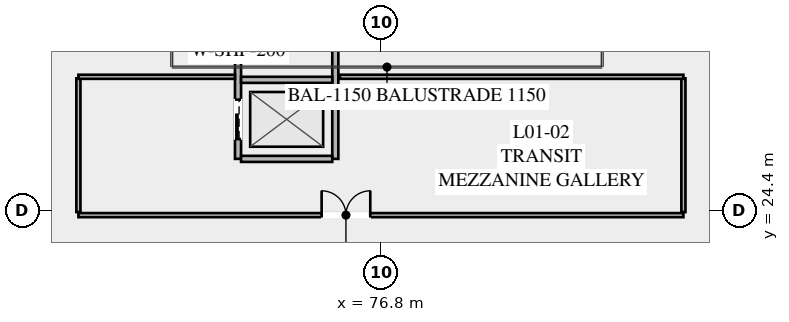
"""IFC4 building model, lengths in metres.
Left out: names, types, materials, properties, quantities, classifications, styles, units other than length and angle.
Written with IfcOpenShell. Run it as: python <this file> out.ifc"""

import sys

from ifc_helpers import new_model, si_unit, direction, frame, frame_2d, origin, place, context, subcontext, project, spatial, rectangle, extrude, element, fill, save


model = new_model("IFC4")
c1 = context("Model", 3, precision=1e-05, world=origin(), true_north=direction((0.0, 1.0)))
c2 = subcontext(c1, "Body", "Model", "MODEL_VIEW")
j1 = project(units=[si_unit("LENGTHUNIT", "METRE"), si_unit("PLANEANGLEUNIT", "RADIAN")], contexts=[c1])
p1 = place(None, origin())
s1 = spatial("IfcSite", under=j1, at=p1, CompositionType="ELEMENT")
p2 = place(p1, origin())
s2 = spatial("IfcBuilding", under=s1, at=p2, CompositionType="ELEMENT")
p3 = place(p2, frame((0.0, 0.0, 5.4)))
s3 = spatial("IfcBuildingStorey", under=s2, at=p3, CompositionType="ELEMENT", Elevation=5.4)
p4 = place(p3, frame((72.1, 26.1, 0.0), z_axis=(0.0, 0.0, 1.0), x_axis=(0.0, 1.0, 0.0)))
e1 = element("IfcWall", 1, at=p4, inside=s3, PredefinedType="SOLIDWALL", context=c2, shape_type="SweptSolid", body=[
    extrude(rectangle(XDim=11.8, YDim=0.2, at=frame_2d((5.9, 0.0))), origin(), (0.0, 0.0, 1.0), 3.583),
])
p5 = place(p4, frame((0.65, 0.0, 0.0)))
e2 = element("IfcOpeningElement", 2, at=p5, cuts=e1, PredefinedType="OPENING", context=c2, shape_type="SweptSolid", body=[
    extrude(rectangle(XDim=1.3, YDim=2.25, at=frame_2d((0.65, 1.125))), frame((0.0, 0.11, 0.0), z_axis=(0.0, -1.0, 0.0), x_axis=(1.0, 0.0, 0.0)), (0.0, 0.0, 1.0), 0.22),
])
p6 = place(p4, frame((9.85, 0.0, 0.0)))
e3 = element("IfcOpeningElement", 3, at=p6, cuts=e1, PredefinedType="OPENING", context=c2, shape_type="SweptSolid", body=[
    extrude(rectangle(XDim=1.3, YDim=2.25, at=frame_2d((0.65, 1.125))), frame((0.0, 0.11, 0.0), z_axis=(0.0, -1.0, 0.0), x_axis=(1.0, 0.0, 0.0)), (0.0, 0.0, 1.0), 0.22),
])
p7 = place(p3, frame((75.3, 26.1, 0.0), z_axis=(0.0, 0.0, 1.0), x_axis=(0.0, 1.0, 0.0)))
e4 = element("IfcWall", 4, at=p7, inside=s3, PredefinedType="SOLIDWALL", context=c2, shape_type="SweptSolid", body=[
    extrude(rectangle(XDim=11.8, YDim=0.2, at=frame_2d((5.9, 0.0))), origin(), (0.0, 0.0, 1.0), 3.583),
])
for number, where, z_axis, x_axis in (
    (5, (72.2, 26.1, 0.0), (0.0, 0.0, 1.0), (1.0, 0.0, 0.0)),
    (6, (72.2, 28.7, 0.0), (0.0, 0.0, 1.0), (1.0, 0.0, 0.0)),
):
    element("IfcWall", number, at=place(p3, frame(where, z_axis=z_axis, x_axis=x_axis)), inside=s3, PredefinedType="SOLIDWALL", context=c2, shape_type="SweptSolid", body=[
        extrude(rectangle(XDim=3.0, YDim=0.2, at=frame_2d((1.5, 0.0))), origin(), (0.0, 0.0, 1.0), 3.583),
    ])
p8 = place(p3, frame((66.85, 24.25, 0.0), z_axis=(0.0, 0.0, 1.0), x_axis=(1.0, 0.0, 0.0)))
e7 = element("IfcWall", 7, at=p8, inside=s3, PredefinedType="PARTITIONING", context=c2, shape_type="SweptSolid", body=[
    extrude(rectangle(XDim=19.9, YDim=0.135, at=frame_2d((9.95, 0.0))), origin(), (0.0, 0.0, 1.0), 3.583),
])
p9 = place(p8, frame((8.0, 0.0, 0.0)))
e8 = element("IfcOpeningElement", 8, at=p9, cuts=e7, PredefinedType="OPENING", context=c2, shape_type="SweptSolid", body=[
    extrude(rectangle(XDim=1.6, YDim=2.25, at=frame_2d((0.8, 1.125))), frame((0.0, 0.077, 0.0), z_axis=(0.0, -1.0, 0.0), x_axis=(1.0, 0.0, 0.0)), (0.0, 0.0, 1.0), 0.155),
])
for number, where, z_axis, x_axis in (
    (9, (66.85, 24.35, 0.0), (0.0, 0.0, 1.0), (0.0, 1.0, 0.0)),
    (10, (86.75, 24.35, 0.0), (0.0, 0.0, 1.0), (0.0, 1.0, 0.0)),
):
    element("IfcWall", number, at=place(p3, frame(where, z_axis=z_axis, x_axis=x_axis)), inside=s3, PredefinedType="PARTITIONING", context=c2, shape_type="SweptSolid", body=[
        extrude(rectangle(XDim=4.4, YDim=0.135, at=frame_2d((2.2, 0.0))), origin(), (0.0, 0.0, 1.0), 3.583),
    ])
p10 = place(p3, frame((66.85, 28.8, 0.0), z_axis=(0.0, 0.0, 1.0), x_axis=(1.0, 0.0, 0.0)))
e11 = element("IfcWall", 11, at=p10, inside=s3, PredefinedType="PARTITIONING", context=c2, shape_type="SweptSolid", body=[
    extrude(rectangle(XDim=5.15, YDim=0.135, at=frame_2d((2.575, 0.0))), origin(), (0.0, 0.0, 1.0), 3.583),
])
p11 = place(p3, frame((75.45, 28.8, 0.0), z_axis=(0.0, 0.0, 1.0), x_axis=(1.0, 0.0, 0.0)))
e12 = element("IfcWall", 12, at=p11, inside=s3, PredefinedType="PARTITIONING", context=c2, shape_type="SweptSolid", body=[
    extrude(rectangle(XDim=11.3, YDim=0.135, at=frame_2d((5.65, 0.0))), origin(), (0.0, 0.0, 1.0), 3.583),
])
p12 = place(p9, origin())
e13 = element("IfcDoor", 13, at=p12, inside=s3, OperationType="DOUBLE_DOOR_SINGLE_SWING", PredefinedType="DOOR", context=c2, shape_type="SweptSolid", body=[
    extrude(rectangle(XDim=1.6, YDim=2.25, at=frame_2d((0.8, 1.125))), frame((0.0, 0.025, 0.0), z_axis=(0.0, -1.0, 0.0), x_axis=(1.0, 0.0, 0.0)), (0.0, 0.0, 1.0), 0.05),
])
fill(e8, e13)
p13 = place(p5, origin())
e14 = element("IfcDoor", 14, at=p13, inside=s3, OperationType="SLIDING_TO_LEFT", PredefinedType="DOOR", context=c2, shape_type="SweptSolid", body=[
    extrude(rectangle(XDim=1.3, YDim=2.25, at=frame_2d((0.65, 1.125))), frame((0.0, 0.025, 0.0), z_axis=(0.0, -1.0, 0.0), x_axis=(1.0, 0.0, 0.0)), (0.0, 0.0, 1.0), 0.05),
])
fill(e2, e14)
save(model, sys.argv[1])
